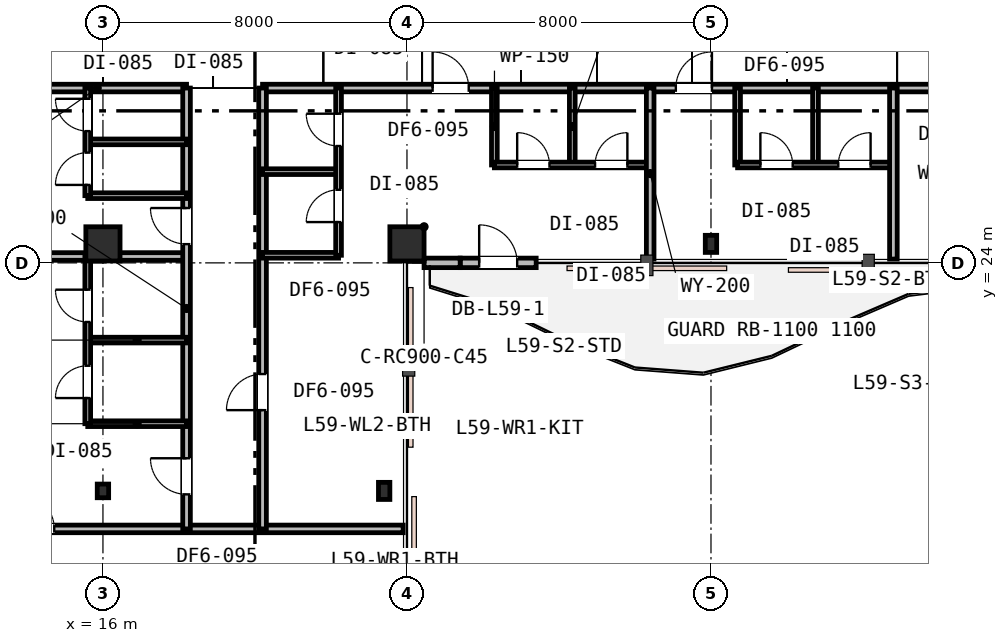
"""IFC4 building model, lengths in metres.
Left out: names, types, materials, properties, quantities, classifications, styles, units other than length and angle.
Written with IfcOpenShell. Run it as: python <this file> out.ifc"""

import sys

from ifc_helpers import new_model, si_unit, direction, frame, frame_2d, origin, origin_2d, place, context, subcontext, project, spatial, rectangle, i_section, extrude, element, fill, save


model = new_model("IFC4")
c1 = context("Model", 3, precision=1e-05, world=origin(), true_north=direction((0.0, 1.0)))
c2 = subcontext(c1, "Body", "Model", "MODEL_VIEW")
j1 = project(units=[si_unit("LENGTHUNIT", "METRE"), si_unit("PLANEANGLEUNIT", "RADIAN")], contexts=[c1])
p1 = place(None, origin())
s1 = spatial("IfcSite", under=j1, at=p1, CompositionType="ELEMENT")
p2 = place(p1, origin())
s2 = spatial("IfcBuilding", under=s1, at=p2, CompositionType="ELEMENT")
p3 = place(p2, frame((0.0, 0.0, 229.8)))
s3 = spatial("IfcBuildingStorey", under=s2, at=p3, CompositionType="ELEMENT", Elevation=229.8)
for number, where, z_axis, x_axis in (
    (1, (16.0, 24.5, 0.0), (0.0, 0.0, 1.0), (1.0, 0.0, 0.0)),
    (2, (24.0, 24.5, 0.0), (0.0, 0.0, 1.0), (1.0, 0.0, 0.0)),
):
    element("IfcColumn", number, at=place(p3, frame(where, z_axis=z_axis, x_axis=x_axis)), inside=s3, PredefinedType="COLUMN", context=c2, shape_type="SweptSolid", body=[
        extrude(rectangle(XDim=0.9, YDim=0.9, at=origin_2d()), origin(), (0.0, 0.0, 1.0), 3.8),
    ])
for number, where, z_axis, x_axis in (
    (3, (32.0, 24.5, 0.0), (0.0, 0.0, 1.0), (1.0, 0.0, 0.0)),
    (4, (23.4, 18.0, 0.0), (0.0, 0.0, 1.0), (1.0, 0.0, 0.0)),
):
    element("IfcColumn", number, at=place(p3, frame(where, z_axis=z_axis, x_axis=x_axis)), inside=s3, PredefinedType="COLUMN", context=c2, shape_type="SweptSolid", body=[
        extrude(i_section(OverallWidth=0.3, OverallDepth=0.45, WebThickness=0.014, FlangeThickness=0.026, FilletRadius=0.027, at=origin_2d()), origin(), (0.0, 0.0, 1.0), 3.8),
    ])
p4 = place(p3, frame((16.0, 18.0, 0.0), z_axis=(0.0, 0.0, 1.0), x_axis=(1.0, 0.0, 0.0)))
e5 = element("IfcColumn", 5, at=p4, inside=s3, PredefinedType="COLUMN", context=c2, shape_type="SweptSolid", body=[
    extrude(i_section(OverallWidth=0.3, OverallDepth=0.36, WebThickness=0.013, FlangeThickness=0.022, FilletRadius=0.027, at=origin_2d()), origin(), (0.0, 0.0, 1.0), 3.8),
])
p5 = place(p3, frame((25.4, 24.0, 0.0), z_axis=(0.0, 0.0, 1.0), x_axis=(1.0, 0.0, 0.0)))
e6 = element("IfcWall", 6, at=p5, inside=s3, PredefinedType="STANDARD", context=c2, shape_type="SweptSolid", body=[
    extrude(rectangle(XDim=2.0, YDim=0.25, at=frame_2d((1.0, 0.0))), origin(), (0.0, 0.0, 1.0), 3.24),
])
p6 = place(p5, frame((0.5, 0.0, 0.0)))
e7 = element("IfcOpeningElement", 7, at=p6, cuts=e6, PredefinedType="OPENING", context=c2, shape_type="SweptSolid", body=[
    extrude(rectangle(XDim=1.0, YDim=2.15, at=frame_2d((0.5, 1.075))), frame((0.0, 0.135, 0.0), z_axis=(0.0, -1.0, 0.0), x_axis=(1.0, 0.0, 0.0)), (0.0, 0.0, 1.0), 0.27),
])
p7 = place(p3, frame((24.45, 24.0, 0.0), z_axis=(0.0, 0.0, 1.0), x_axis=(1.0, 0.0, 0.0)))
e8 = element("IfcWall", 8, at=p7, inside=s3, PredefinedType="STANDARD", context=c2, shape_type="SweptSolid", body=[
    extrude(rectangle(XDim=0.95, YDim=0.25, at=frame_2d((0.475, 0.0))), origin(), (0.0, 0.0, 1.0), 3.24),
])
p8 = place(p3, frame((13.5, 28.6, 0.0), z_axis=(0.0, 0.0, 1.0), x_axis=(1.0, 0.0, 0.0)))
e9 = element("IfcWall", 9, at=p8, inside=s3, PredefinedType="PARTITIONING", context=c2, shape_type="SweptSolid", body=[
    extrude(rectangle(XDim=4.7, YDim=0.2, at=frame_2d((2.35, 0.0))), origin(), (0.0, 0.0, 1.0), 2.92),
])
p9 = place(p3, frame((20.2, 28.6, 0.0), z_axis=(0.0, 0.0, 1.0), x_axis=(1.0, 0.0, 0.0)))
e10 = element("IfcWall", 10, at=p9, inside=s3, PredefinedType="PARTITIONING", context=c2, shape_type="SweptSolid", body=[
    extrude(rectangle(XDim=25.7, YDim=0.2, at=frame_2d((12.85, 0.0))), origin(), (0.0, 0.0, 1.0), 2.92),
])
p10 = place(p9, frame((4.475, 0.0, 0.0)))
e11 = element("IfcOpeningElement", 11, at=p10, cuts=e10, PredefinedType="OPENING", context=c2, shape_type="SweptSolid", body=[
    extrude(rectangle(XDim=0.95, YDim=2.15, at=frame_2d((0.475, 1.075))), frame((0.0, 0.11, 0.0), z_axis=(0.0, -1.0, 0.0), x_axis=(1.0, 0.0, 0.0)), (0.0, 0.0, 1.0), 0.22),
])
p11 = place(p9, frame((10.875, 0.0, 0.0)))
e12 = element("IfcOpeningElement", 12, at=p11, cuts=e10, PredefinedType="OPENING", context=c2, shape_type="SweptSolid", body=[
    extrude(rectangle(XDim=0.95, YDim=2.15, at=frame_2d((0.475, 1.075))), frame((0.0, 0.11, 0.0), z_axis=(0.0, -1.0, 0.0), x_axis=(1.0, 0.0, 0.0)), (0.0, 0.0, 1.0), 0.22),
])
p12 = place(p9, frame((17.854, 0.0, 0.0)))
e13 = element("IfcOpeningElement", 13, at=p12, cuts=e10, PredefinedType="OPENING", context=c2, shape_type="SweptSolid", body=[
    extrude(rectangle(XDim=0.95, YDim=2.15, at=frame_2d((0.475, 1.075))), frame((0.0, 0.11, 0.0), z_axis=(0.0, -1.0, 0.0), x_axis=(1.0, 0.0, 0.0)), (0.0, 0.0, 1.0), 0.22),
])
p13 = place(p3, frame((26.3, 26.576, 0.0), z_axis=(0.0, 0.0, 1.0), x_axis=(0.0, 1.0, 0.0)))
e14 = element("IfcWall", 14, at=p13, inside=s3, PredefinedType="PARTITIONING", context=c2, shape_type="SweptSolid", body=[
    extrude(rectangle(XDim=2.024, YDim=0.15, at=frame_2d((1.012, 0.0))), origin(), (0.0, 0.0, 1.0), 3.22),
])
p14 = place(p3, frame((28.35, 26.576, 0.0), z_axis=(0.0, 0.0, 1.0), x_axis=(0.0, 1.0, 0.0)))
e15 = element("IfcWall", 15, at=p14, inside=s3, PredefinedType="PARTITIONING", context=c2, shape_type="SweptSolid", body=[
    extrude(rectangle(XDim=2.024, YDim=0.15, at=frame_2d((1.012, 0.0))), origin(), (0.0, 0.0, 1.0), 3.53),
])
p15 = place(p3, frame((26.3, 26.576, 0.0), z_axis=(0.0, 0.0, 1.0), x_axis=(1.0, 0.0, 0.0)))
e16 = element("IfcWall", 16, at=p15, inside=s3, PredefinedType="PARTITIONING", context=c2, shape_type="SweptSolid", body=[
    extrude(rectangle(XDim=4.1, YDim=0.15, at=frame_2d((2.05, 0.0))), origin(), (0.0, 0.0, 1.0), 3.22),
])
p16 = place(p15, frame((0.6, 0.0, 0.0)))
e17 = element("IfcOpeningElement", 17, at=p16, cuts=e16, PredefinedType="OPENING", context=c2, shape_type="SweptSolid", body=[
    extrude(rectangle(XDim=0.85, YDim=2.15, at=frame_2d((0.425, 1.075))), frame((0.0, 0.085, 0.0), z_axis=(0.0, -1.0, 0.0), x_axis=(1.0, 0.0, 0.0)), (0.0, 0.0, 1.0), 0.17),
])
p17 = place(p15, frame((2.65, 0.0, 0.0)))
e18 = element("IfcOpeningElement", 18, at=p17, cuts=e16, PredefinedType="OPENING", context=c2, shape_type="SweptSolid", body=[
    extrude(rectangle(XDim=0.85, YDim=2.15, at=frame_2d((0.425, 1.075))), frame((0.0, 0.085, 0.0), z_axis=(0.0, -1.0, 0.0), x_axis=(1.0, 0.0, 0.0)), (0.0, 0.0, 1.0), 0.17),
])
p18 = place(p3, frame((30.4, 24.1, 0.0), z_axis=(0.0, 0.0, 1.0), x_axis=(0.0, 1.0, 0.0)))
e19 = element("IfcWall", 19, at=p18, inside=s3, PredefinedType="PARTITIONING", context=c2, shape_type="SweptSolid", body=[
    extrude(rectangle(XDim=4.5, YDim=0.2, at=frame_2d((2.25, 0.0))), origin(), (0.0, 0.0, 1.0), 3.24),
])
p19 = place(p3, frame((32.7, 26.576, 0.0), z_axis=(0.0, 0.0, 1.0), x_axis=(0.0, 1.0, 0.0)))
e20 = element("IfcWall", 20, at=p19, inside=s3, PredefinedType="PARTITIONING", context=c2, shape_type="SweptSolid", body=[
    extrude(rectangle(XDim=2.024, YDim=0.15, at=frame_2d((1.012, 0.0))), origin(), (0.0, 0.0, 1.0), 3.53),
])
p20 = place(p3, frame((34.75, 26.576, 0.0), z_axis=(0.0, 0.0, 1.0), x_axis=(0.0, 1.0, 0.0)))
e21 = element("IfcWall", 21, at=p20, inside=s3, PredefinedType="PARTITIONING", context=c2, shape_type="SweptSolid", body=[
    extrude(rectangle(XDim=2.024, YDim=0.15, at=frame_2d((1.012, 0.0))), origin(), (0.0, 0.0, 1.0), 3.22),
])
p21 = place(p3, frame((32.7, 26.576, 0.0), z_axis=(0.0, 0.0, 1.0), x_axis=(1.0, 0.0, 0.0)))
e22 = element("IfcWall", 22, at=p21, inside=s3, PredefinedType="PARTITIONING", context=c2, shape_type="SweptSolid", body=[
    extrude(rectangle(XDim=4.1, YDim=0.15, at=frame_2d((2.05, 0.0))), origin(), (0.0, 0.0, 1.0), 3.22),
])
p22 = place(p21, frame((0.6, 0.0, 0.0)))
e23 = element("IfcOpeningElement", 23, at=p22, cuts=e22, PredefinedType="OPENING", context=c2, shape_type="SweptSolid", body=[
    extrude(rectangle(XDim=0.85, YDim=2.15, at=frame_2d((0.425, 1.075))), frame((0.0, 0.085, 0.0), z_axis=(0.0, -1.0, 0.0), x_axis=(1.0, 0.0, 0.0)), (0.0, 0.0, 1.0), 0.17),
])
p23 = place(p21, frame((2.65, 0.0, 0.0)))
e24 = element("IfcOpeningElement", 24, at=p23, cuts=e22, PredefinedType="OPENING", context=c2, shape_type="SweptSolid", body=[
    extrude(rectangle(XDim=0.85, YDim=2.15, at=frame_2d((0.425, 1.075))), frame((0.0, 0.085, 0.0), z_axis=(0.0, -1.0, 0.0), x_axis=(1.0, 0.0, 0.0)), (0.0, 0.0, 1.0), 0.17),
])
p24 = place(p3, frame((36.8, 24.1, 0.0), z_axis=(0.0, 0.0, 1.0), x_axis=(0.0, 1.0, 0.0)))
e25 = element("IfcWall", 25, at=p24, inside=s3, PredefinedType="PARTITIONING", context=c2, shape_type="SweptSolid", body=[
    extrude(rectangle(XDim=4.5, YDim=0.2, at=frame_2d((2.25, 0.0))), origin(), (0.0, 0.0, 1.0), 3.22),
])
p25 = place(p3, frame((5.1, 17.0, 0.0), z_axis=(0.0, 0.0, 1.0), x_axis=(1.0, 0.0, 0.0)))
e26 = element("IfcWall", 26, at=p25, inside=s3, PredefinedType="PARTITIONING", context=c2, shape_type="SweptSolid", body=[
    extrude(rectangle(XDim=18.8, YDim=0.2, at=frame_2d((9.4, 0.0))), origin(), (0.0, 0.0, 1.0), 2.92),
])
p26 = place(p25, frame((8.668, 0.0, 0.0)))
e27 = element("IfcOpeningElement", 27, at=p26, cuts=e26, PredefinedType="OPENING", context=c2, shape_type="SweptSolid", body=[
    extrude(rectangle(XDim=0.95, YDim=2.15, at=frame_2d((0.475, 1.075))), frame((0.0, 0.11, 0.0), z_axis=(0.0, -1.0, 0.0), x_axis=(1.0, 0.0, 0.0)), (0.0, 0.0, 1.0), 0.22),
])
p27 = place(p3, frame((5.1, 24.168, 0.0), z_axis=(0.0, 0.0, 1.0), x_axis=(1.0, 0.0, 0.0)))
e28 = element("IfcWall", 28, at=p27, inside=s3, PredefinedType="PARTITIONING", context=c2, shape_type="SweptSolid", body=[
    extrude(rectangle(XDim=13.1, YDim=0.2, at=frame_2d((6.55, 0.0))), origin(), (0.0, 0.0, 1.0), 2.92),
])
p28 = place(p3, frame((18.2, 17.0, 0.0), z_axis=(0.0, 0.0, 1.0), x_axis=(0.0, 1.0, 0.0)))
e29 = element("IfcWall", 29, at=p28, inside=s3, PredefinedType="PARTITIONING", context=c2, shape_type="SweptSolid", body=[
    extrude(rectangle(XDim=11.6, YDim=0.2, at=frame_2d((5.8, 0.0))), origin(), (0.0, 0.0, 1.0), 2.92),
])
p29 = place(p28, frame((7.493, 0.0, 0.0)))
e30 = element("IfcOpeningElement", 30, at=p29, cuts=e29, PredefinedType="OPENING", context=c2, shape_type="SweptSolid", body=[
    extrude(rectangle(XDim=0.95, YDim=2.15, at=frame_2d((0.475, 1.075))), frame((0.0, 0.11, 0.0), z_axis=(0.0, -1.0, 0.0), x_axis=(1.0, 0.0, 0.0)), (0.0, 0.0, 1.0), 0.22),
])
p30 = place(p28, frame((0.909, 0.0, 0.0)))
e31 = element("IfcOpeningElement", 31, at=p30, cuts=e29, PredefinedType="OPENING", context=c2, shape_type="SweptSolid", body=[
    extrude(rectangle(XDim=0.95, YDim=2.15, at=frame_2d((0.475, 1.075))), frame((0.0, 0.11, 0.0), z_axis=(0.0, -1.0, 0.0), x_axis=(1.0, 0.0, 0.0)), (0.0, 0.0, 1.0), 0.22),
])
for number, where, z_axis, x_axis in (
    (32, (15.6, 25.768, 0.0), (0.0, 0.0, 1.0), (1.0, 0.0, 0.0)),
    (33, (15.6, 27.184, 0.0), (0.0, 0.0, 1.0), (1.0, 0.0, 0.0)),
):
    element("IfcWall", number, at=place(p3, frame(where, z_axis=z_axis, x_axis=x_axis)), inside=s3, PredefinedType="PARTITIONING", context=c2, shape_type="SweptSolid", body=[
        extrude(rectangle(XDim=2.6, YDim=0.15, at=frame_2d((1.3, 0.0))), origin(), (0.0, 0.0, 1.0), 2.92),
    ])
p31 = place(p3, frame((15.6, 25.768, 0.0), z_axis=(0.0, 0.0, 1.0), x_axis=(0.0, 1.0, 0.0)))
e34 = element("IfcWall", 34, at=p31, inside=s3, PredefinedType="PARTITIONING", context=c2, shape_type="SweptSolid", body=[
    extrude(rectangle(XDim=2.832, YDim=0.15, at=frame_2d((1.416, 0.0))), origin(), (0.0, 0.0, 1.0), 2.92),
])
p32 = place(p31, frame((0.283, 0.0, 0.0)))
e35 = element("IfcOpeningElement", 35, at=p32, cuts=e34, PredefinedType="OPENING", context=c2, shape_type="SweptSolid", body=[
    extrude(rectangle(XDim=0.85, YDim=2.15, at=frame_2d((0.425, 1.075))), frame((0.0, 0.085, 0.0), z_axis=(0.0, -1.0, 0.0), x_axis=(1.0, 0.0, 0.0)), (0.0, 0.0, 1.0), 0.17),
])
p33 = place(p31, frame((1.699, 0.0, 0.0)))
e36 = element("IfcOpeningElement", 36, at=p33, cuts=e34, PredefinedType="OPENING", context=c2, shape_type="SweptSolid", body=[
    extrude(rectangle(XDim=0.85, YDim=2.15, at=frame_2d((0.425, 1.075))), frame((0.0, 0.085, 0.0), z_axis=(0.0, -1.0, 0.0), x_axis=(1.0, 0.0, 0.0)), (0.0, 0.0, 1.0), 0.17),
])
for number, where, z_axis, x_axis in (
    (37, (15.6, 19.768, 0.0), (0.0, 0.0, 1.0), (1.0, 0.0, 0.0)),
    (38, (15.6, 21.968, 0.0), (0.0, 0.0, 1.0), (1.0, 0.0, 0.0)),
):
    element("IfcWall", number, at=place(p3, frame(where, z_axis=z_axis, x_axis=x_axis)), inside=s3, PredefinedType="PARTITIONING", context=c2, shape_type="SweptSolid", body=[
        extrude(rectangle(XDim=2.6, YDim=0.15, at=frame_2d((1.3, 0.0))), origin(), (0.0, 0.0, 1.0), 2.92),
    ])
p34 = place(p3, frame((15.6, 19.768, 0.0), z_axis=(0.0, 0.0, 1.0), x_axis=(0.0, 1.0, 0.0)))
e39 = element("IfcWall", 39, at=p34, inside=s3, PredefinedType="PARTITIONING", context=c2, shape_type="SweptSolid", body=[
    extrude(rectangle(XDim=4.4, YDim=0.15, at=frame_2d((2.2, 0.0))), origin(), (0.0, 0.0, 1.0), 2.92),
])
p35 = place(p34, frame((0.675, 0.0, 0.0)))
e40 = element("IfcOpeningElement", 40, at=p35, cuts=e39, PredefinedType="OPENING", context=c2, shape_type="SweptSolid", body=[
    extrude(rectangle(XDim=0.85, YDim=2.15, at=frame_2d((0.425, 1.075))), frame((0.0, 0.085, 0.0), z_axis=(0.0, -1.0, 0.0), x_axis=(1.0, 0.0, 0.0)), (0.0, 0.0, 1.0), 0.17),
])
p36 = place(p34, frame((2.677, 0.0, 0.0)))
e41 = element("IfcOpeningElement", 41, at=p36, cuts=e39, PredefinedType="OPENING", context=c2, shape_type="SweptSolid", body=[
    extrude(rectangle(XDim=0.85, YDim=2.15, at=frame_2d((0.425, 1.075))), frame((0.0, 0.085, 0.0), z_axis=(0.0, -1.0, 0.0), x_axis=(1.0, 0.0, 0.0)), (0.0, 0.0, 1.0), 0.17),
])
p37 = place(p3, frame((20.2, 17.0, 0.0), z_axis=(0.0, 0.0, 1.0), x_axis=(0.0, 1.0, 0.0)))
e42 = element("IfcWall", 42, at=p37, inside=s3, PredefinedType="PARTITIONING", context=c2, shape_type="SweptSolid", body=[
    extrude(rectangle(XDim=11.6, YDim=0.2, at=frame_2d((5.8, 0.0))), origin(), (0.0, 0.0, 1.0), 2.92),
])
p38 = place(p37, frame((3.125, 0.0, 0.0)))
e43 = element("IfcOpeningElement", 43, at=p38, cuts=e42, PredefinedType="OPENING", context=c2, shape_type="SweptSolid", body=[
    extrude(rectangle(XDim=0.95, YDim=2.15, at=frame_2d((0.475, 1.075))), frame((0.0, 0.11, 0.0), z_axis=(0.0, -1.0, 0.0), x_axis=(1.0, 0.0, 0.0)), (0.0, 0.0, 1.0), 0.22),
])
p39 = place(p3, frame((20.2, 24.2, 0.0), z_axis=(0.0, 0.0, 1.0), x_axis=(1.0, 0.0, 0.0)))
e44 = element("IfcWall", 44, at=p39, inside=s3, PredefinedType="PARTITIONING", context=c2, shape_type="SweptSolid", body=[
    extrude(rectangle(XDim=2.0, YDim=0.15, at=frame_2d((1.0, 0.0))), origin(), (0.0, 0.0, 1.0), 2.92),
])
p40 = place(p3, frame((20.2, 26.4, 0.0), z_axis=(0.0, 0.0, 1.0), x_axis=(1.0, 0.0, 0.0)))
e45 = element("IfcWall", 45, at=p40, inside=s3, PredefinedType="PARTITIONING", context=c2, shape_type="SweptSolid", body=[
    extrude(rectangle(XDim=2.0, YDim=0.15, at=frame_2d((1.0, 0.0))), origin(), (0.0, 0.0, 1.0), 3.22),
])
p41 = place(p3, frame((22.2, 24.2, 0.0), z_axis=(0.0, 0.0, 1.0), x_axis=(0.0, 1.0, 0.0)))
e46 = element("IfcWall", 46, at=p41, inside=s3, PredefinedType="PARTITIONING", context=c2, shape_type="SweptSolid", body=[
    extrude(rectangle(XDim=4.4, YDim=0.15, at=frame_2d((2.2, 0.0))), origin(), (0.0, 0.0, 1.0), 2.92),
])
p42 = place(p41, frame((0.873, 0.0, 0.0)))
e47 = element("IfcOpeningElement", 47, at=p42, cuts=e46, PredefinedType="OPENING", context=c2, shape_type="SweptSolid", body=[
    extrude(rectangle(XDim=0.85, YDim=2.15, at=frame_2d((0.425, 1.075))), frame((0.0, 0.085, 0.0), z_axis=(0.0, -1.0, 0.0), x_axis=(1.0, 0.0, 0.0)), (0.0, 0.0, 1.0), 0.17),
])
p43 = place(p41, frame((2.875, 0.0, 0.0)))
e48 = element("IfcOpeningElement", 48, at=p43, cuts=e46, PredefinedType="OPENING", context=c2, shape_type="SweptSolid", body=[
    extrude(rectangle(XDim=0.85, YDim=2.15, at=frame_2d((0.425, 1.075))), frame((0.0, 0.085, 0.0), z_axis=(0.0, -1.0, 0.0), x_axis=(1.0, 0.0, 0.0)), (0.0, 0.0, 1.0), 0.17),
])
p44 = place(p6, origin())
e49 = element("IfcDoor", 49, at=p44, inside=s3, OperationType="SINGLE_SWING_LEFT", PredefinedType="DOOR", context=c2, shape_type="SweptSolid", body=[
    extrude(rectangle(XDim=1.0, YDim=2.15, at=frame_2d((0.5, 1.075))), frame((0.0, 0.025, 0.0), z_axis=(0.0, -1.0, 0.0), x_axis=(1.0, 0.0, 0.0)), (0.0, 0.0, 1.0), 0.05),
])
fill(e7, e49)
p45 = place(p10, origin())
e50 = element("IfcDoor", 50, at=p45, inside=s3, OperationType="SINGLE_SWING_LEFT", PredefinedType="DOOR", context=c2, shape_type="SweptSolid", body=[
    extrude(rectangle(XDim=0.95, YDim=2.15, at=frame_2d((0.475, 1.075))), frame((0.0, 0.025, 0.0), z_axis=(0.0, -1.0, 0.0), x_axis=(1.0, 0.0, 0.0)), (0.0, 0.0, 1.0), 0.05),
])
fill(e11, e50)
p46 = place(p16, origin())
e51 = element("IfcDoor", 51, at=p46, inside=s3, OperationType="SINGLE_SWING_LEFT", PredefinedType="DOOR", context=c2, shape_type="SweptSolid", body=[
    extrude(rectangle(XDim=0.85, YDim=2.15, at=frame_2d((0.425, 1.075))), frame((0.0, 0.025, 0.0), z_axis=(0.0, -1.0, 0.0), x_axis=(1.0, 0.0, 0.0)), (0.0, 0.0, 1.0), 0.05),
])
fill(e17, e51)
p47 = place(p17, origin())
e52 = element("IfcDoor", 52, at=p47, inside=s3, OperationType="SINGLE_SWING_RIGHT", PredefinedType="DOOR", context=c2, shape_type="SweptSolid", body=[
    extrude(rectangle(XDim=0.85, YDim=2.15, at=frame_2d((0.425, 1.075))), frame((0.0, 0.025, 0.0), z_axis=(0.0, -1.0, 0.0), x_axis=(1.0, 0.0, 0.0)), (0.0, 0.0, 1.0), 0.05),
])
fill(e18, e52)
p48 = place(p11, origin())
e53 = element("IfcDoor", 53, at=p48, inside=s3, OperationType="SINGLE_SWING_RIGHT", PredefinedType="DOOR", context=c2, shape_type="SweptSolid", body=[
    extrude(rectangle(XDim=0.95, YDim=2.15, at=frame_2d((0.475, 1.075))), frame((0.0, 0.025, 0.0), z_axis=(0.0, -1.0, 0.0), x_axis=(1.0, 0.0, 0.0)), (0.0, 0.0, 1.0), 0.05),
])
fill(e12, e53)
p49 = place(p22, origin())
e54 = element("IfcDoor", 54, at=p49, inside=s3, OperationType="SINGLE_SWING_LEFT", PredefinedType="DOOR", context=c2, shape_type="SweptSolid", body=[
    extrude(rectangle(XDim=0.85, YDim=2.15, at=frame_2d((0.425, 1.075))), frame((0.0, 0.025, 0.0), z_axis=(0.0, -1.0, 0.0), x_axis=(1.0, 0.0, 0.0)), (0.0, 0.0, 1.0), 0.05),
])
fill(e23, e54)
p50 = place(p23, origin())
e55 = element("IfcDoor", 55, at=p50, inside=s3, OperationType="SINGLE_SWING_RIGHT", PredefinedType="DOOR", context=c2, shape_type="SweptSolid", body=[
    extrude(rectangle(XDim=0.85, YDim=2.15, at=frame_2d((0.425, 1.075))), frame((0.0, 0.025, 0.0), z_axis=(0.0, -1.0, 0.0), x_axis=(1.0, 0.0, 0.0)), (0.0, 0.0, 1.0), 0.05),
])
fill(e24, e55)
p51 = place(p29, origin())
e56 = element("IfcDoor", 56, at=p51, inside=s3, OperationType="SINGLE_SWING_RIGHT", PredefinedType="DOOR", context=c2, shape_type="SweptSolid", body=[
    extrude(rectangle(XDim=0.95, YDim=2.15, at=frame_2d((0.475, 1.075))), frame((0.0, 0.025, 0.0), z_axis=(0.0, -1.0, 0.0), x_axis=(1.0, 0.0, 0.0)), (0.0, 0.0, 1.0), 0.05),
])
fill(e30, e56)
p52 = place(p32, origin())
e57 = element("IfcDoor", 57, at=p52, inside=s3, OperationType="SINGLE_SWING_LEFT", PredefinedType="DOOR", context=c2, shape_type="SweptSolid", body=[
    extrude(rectangle(XDim=0.85, YDim=2.15, at=frame_2d((0.425, 1.075))), frame((0.0, 0.025, 0.0), z_axis=(0.0, -1.0, 0.0), x_axis=(1.0, 0.0, 0.0)), (0.0, 0.0, 1.0), 0.05),
])
fill(e35, e57)
p53 = place(p33, origin())
e58 = element("IfcDoor", 58, at=p53, inside=s3, OperationType="SINGLE_SWING_RIGHT", PredefinedType="DOOR", context=c2, shape_type="SweptSolid", body=[
    extrude(rectangle(XDim=0.85, YDim=2.15, at=frame_2d((0.425, 1.075))), frame((0.0, 0.025, 0.0), z_axis=(0.0, -1.0, 0.0), x_axis=(1.0, 0.0, 0.0)), (0.0, 0.0, 1.0), 0.05),
])
fill(e36, e58)
p54 = place(p30, origin())
e59 = element("IfcDoor", 59, at=p54, inside=s3, OperationType="SINGLE_SWING_RIGHT", PredefinedType="DOOR", context=c2, shape_type="SweptSolid", body=[
    extrude(rectangle(XDim=0.95, YDim=2.15, at=frame_2d((0.475, 1.075))), frame((0.0, 0.025, 0.0), z_axis=(0.0, -1.0, 0.0), x_axis=(1.0, 0.0, 0.0)), (0.0, 0.0, 1.0), 0.05),
])
fill(e31, e59)
p55 = place(p35, origin())
e60 = element("IfcDoor", 60, at=p55, inside=s3, OperationType="SINGLE_SWING_LEFT", PredefinedType="DOOR", context=c2, shape_type="SweptSolid", body=[
    extrude(rectangle(XDim=0.85, YDim=2.15, at=frame_2d((0.425, 1.075))), frame((0.0, 0.025, 0.0), z_axis=(0.0, -1.0, 0.0), x_axis=(1.0, 0.0, 0.0)), (0.0, 0.0, 1.0), 0.05),
])
fill(e40, e60)
p56 = place(p36, origin())
e61 = element("IfcDoor", 61, at=p56, inside=s3, OperationType="SINGLE_SWING_RIGHT", PredefinedType="DOOR", context=c2, shape_type="SweptSolid", body=[
    extrude(rectangle(XDim=0.85, YDim=2.15, at=frame_2d((0.425, 1.075))), frame((0.0, 0.025, 0.0), z_axis=(0.0, -1.0, 0.0), x_axis=(1.0, 0.0, 0.0)), (0.0, 0.0, 1.0), 0.05),
])
fill(e41, e61)
p57 = place(p38, origin())
e62 = element("IfcDoor", 62, at=p57, inside=s3, OperationType="SINGLE_SWING_LEFT", PredefinedType="DOOR", context=c2, shape_type="SweptSolid", body=[
    extrude(rectangle(XDim=0.95, YDim=2.15, at=frame_2d((0.475, 1.075))), frame((0.0, 0.025, 0.0), z_axis=(0.0, -1.0, 0.0), x_axis=(1.0, 0.0, 0.0)), (0.0, 0.0, 1.0), 0.05),
])
fill(e43, e62)
p58 = place(p42, origin())
e63 = element("IfcDoor", 63, at=p58, inside=s3, OperationType="SINGLE_SWING_LEFT", PredefinedType="DOOR", context=c2, shape_type="SweptSolid", body=[
    extrude(rectangle(XDim=0.85, YDim=2.15, at=frame_2d((0.425, 1.075))), frame((0.0, 0.025, 0.0), z_axis=(0.0, -1.0, 0.0), x_axis=(1.0, 0.0, 0.0)), (0.0, 0.0, 1.0), 0.05),
])
fill(e47, e63)
p59 = place(p43, origin())
e64 = element("IfcDoor", 64, at=p59, inside=s3, OperationType="SINGLE_SWING_RIGHT", PredefinedType="DOOR", context=c2, shape_type="SweptSolid", body=[
    extrude(rectangle(XDim=0.85, YDim=2.15, at=frame_2d((0.425, 1.075))), frame((0.0, 0.025, 0.0), z_axis=(0.0, -1.0, 0.0), x_axis=(1.0, 0.0, 0.0)), (0.0, 0.0, 1.0), 0.05),
])
fill(e48, e64)
p60 = place(p26, origin())
e65 = element("IfcDoor", 65, at=p60, inside=s3, OperationType="SINGLE_SWING_LEFT", PredefinedType="DOOR", context=c2, shape_type="SweptSolid", body=[
    extrude(rectangle(XDim=0.95, YDim=2.15, at=frame_2d((0.475, 1.075))), frame((0.0, 0.025, 0.0), z_axis=(0.0, -1.0, 0.0), x_axis=(1.0, 0.0, 0.0)), (0.0, 0.0, 1.0), 0.05),
])
fill(e27, e65)
save(model, sys.argv[1])
